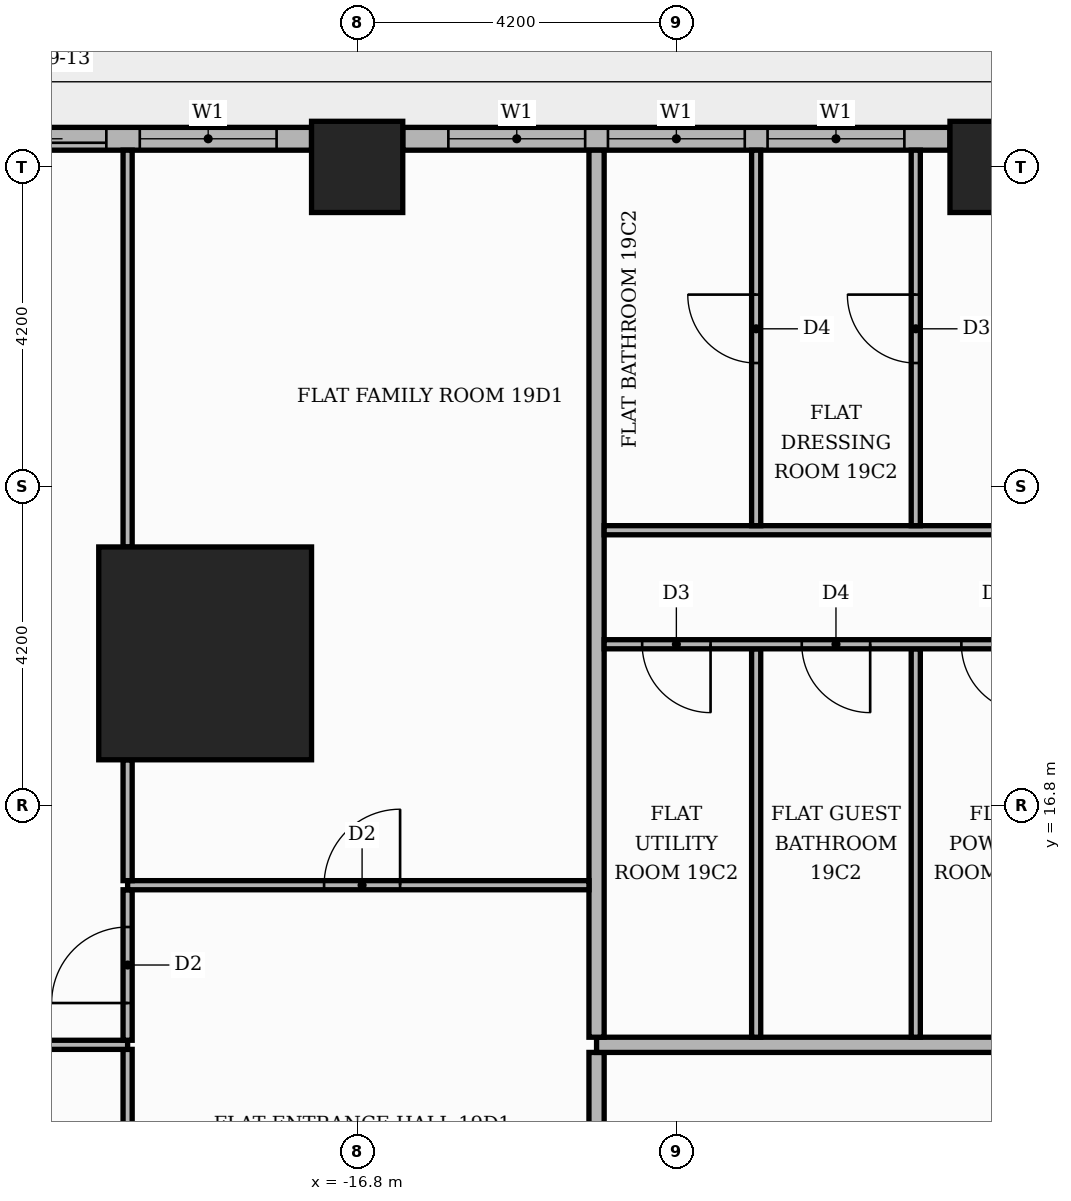
"""IFC4 building model, lengths in metres.
Left out: names, types, materials, properties, quantities, classifications, styles, units other than length and angle.
Written with IfcOpenShell. Run it as: python <this file> out.ifc"""

import sys

from ifc_helpers import new_model, si_unit, direction, frame, frame_2d, origin, origin_2d, place, context, subcontext, project, spatial, rectangle, extrude, element, fill, save


model = new_model("IFC4")
c1 = context("Model", 3, precision=1e-05, world=origin(), true_north=direction((0.0, 1.0)))
c2 = subcontext(c1, "Body", "Model", "MODEL_VIEW")
j1 = project(units=[si_unit("LENGTHUNIT", "METRE"), si_unit("PLANEANGLEUNIT", "RADIAN")], contexts=[c1])
p1 = place(None, origin())
s1 = spatial("IfcSite", under=j1, at=p1, CompositionType="ELEMENT")
p2 = place(p1, origin())
s2 = spatial("IfcBuilding", under=s1, at=p2, CompositionType="ELEMENT")
p3 = place(p2, frame((0.0, 0.0, 83.1)))
s3 = spatial("IfcBuildingStorey", under=s2, at=p3, CompositionType="ELEMENT", Elevation=83.1)
p4 = place(p3, frame((-18.8, 18.8, 0.0), z_axis=(0.0, 0.0, 1.0), x_axis=(1.0, 0.0, 0.0)))
e1 = element("IfcColumn", 1, at=p4, inside=s3, PredefinedType="COLUMN", context=c2, shape_type="SweptSolid", body=[
    extrude(rectangle(XDim=2.8, YDim=2.8, at=origin_2d()), origin(), (0.0, 0.0, 1.0), 3.9),
])
for number, where, z_axis, x_axis in (
    (2, (-8.4, 25.2, 0.0), (0.0, 0.0, 1.0), (1.0, 0.0, 0.0)),
    (3, (-16.8, 25.2, 0.0), (0.0, 0.0, 1.0), (1.0, 0.0, 0.0)),
):
    element("IfcColumn", number, at=place(p3, frame(where, z_axis=z_axis, x_axis=x_axis)), inside=s3, PredefinedType="COLUMN", context=c2, shape_type="SweptSolid", body=[
        extrude(rectangle(XDim=1.2, YDim=1.2, at=origin_2d()), origin(), (0.0, 0.0, 1.0), 3.9),
    ])
p5 = place(p3, frame((-9.0, 25.57, 0.0), z_axis=(0.0, 0.0, 1.0), x_axis=(-1.0, 0.0, 0.0)))
e4 = element("IfcWall", 4, at=p5, inside=s3, PredefinedType="STANDARD", context=c2, shape_type="SweptSolid", body=[
    extrude(rectangle(XDim=7.2, YDim=0.3, at=frame_2d((3.6, 0.0))), origin(), (0.0, 0.0, 1.0), 3.48),
])
p6 = place(p5, frame((0.6, 0.0, 0.9)))
e5 = element("IfcOpeningElement", 5, at=p6, cuts=e4, PredefinedType="OPENING", context=c2, shape_type="SweptSolid", body=[
    extrude(rectangle(XDim=1.8, YDim=2.1, at=frame_2d((0.9, 1.05))), frame((0.0, 0.16, 0.0), z_axis=(0.0, -1.0, 0.0), x_axis=(1.0, 0.0, 0.0)), (0.0, 0.0, 1.0), 0.32),
])
p7 = place(p5, frame((2.7, 0.0, 0.9)))
e6 = element("IfcOpeningElement", 6, at=p7, cuts=e4, PredefinedType="OPENING", context=c2, shape_type="SweptSolid", body=[
    extrude(rectangle(XDim=1.8, YDim=2.1, at=frame_2d((0.9, 1.05))), frame((0.0, 0.16, 0.0), z_axis=(0.0, -1.0, 0.0), x_axis=(1.0, 0.0, 0.0)), (0.0, 0.0, 1.0), 0.32),
])
p8 = place(p5, frame((4.8, 0.0, 0.9)))
e7 = element("IfcOpeningElement", 7, at=p8, cuts=e4, PredefinedType="OPENING", context=c2, shape_type="SweptSolid", body=[
    extrude(rectangle(XDim=1.8, YDim=2.1, at=frame_2d((0.9, 1.05))), frame((0.0, 0.16, 0.0), z_axis=(0.0, -1.0, 0.0), x_axis=(1.0, 0.0, 0.0)), (0.0, 0.0, 1.0), 0.32),
])
p9 = place(p3, frame((-17.4, 25.57, 0.0), z_axis=(0.0, 0.0, 1.0), x_axis=(-1.0, 0.0, 0.0)))
e8 = element("IfcWall", 8, at=p9, inside=s3, PredefinedType="STANDARD", context=c2, shape_type="SweptSolid", body=[
    extrude(rectangle(XDim=4.82, YDim=0.3, at=frame_2d((2.41, 0.0))), origin(), (0.0, 0.0, 1.0), 3.48),
])
p10 = place(p9, frame((2.7, 0.0, 0.0)))
e9 = element("IfcOpeningElement", 9, at=p10, cuts=e8, PredefinedType="OPENING", context=c2, shape_type="SweptSolid", body=[
    extrude(rectangle(XDim=1.8, YDim=2.4, at=frame_2d((0.9, 1.2))), frame((0.0, 0.16, 0.0), z_axis=(0.0, -1.0, 0.0), x_axis=(1.0, 0.0, 0.0)), (0.0, 0.0, 1.0), 0.32),
])
p11 = place(p9, frame((0.46, 0.0, 0.9)))
e10 = element("IfcOpeningElement", 10, at=p11, cuts=e8, PredefinedType="OPENING", context=c2, shape_type="SweptSolid", body=[
    extrude(rectangle(XDim=1.8, YDim=2.1, at=frame_2d((0.9, 1.05))), frame((0.0, 0.16, 0.0), z_axis=(0.0, -1.0, 0.0), x_axis=(1.0, 0.0, 0.0)), (0.0, 0.0, 1.0), 0.32),
])
p12 = place(p3, frame((-13.65, 5.35, 0.0), z_axis=(0.0, 0.0, 1.0), x_axis=(0.0, 1.0, 0.0)))
e11 = element("IfcWall", 11, at=p12, inside=s3, PredefinedType="PARTITIONING", context=c2, shape_type="SweptSolid", body=[
    extrude(rectangle(XDim=8.2, YDim=0.2, at=frame_2d((4.1, 0.0))), origin(), (0.0, 0.0, 1.0), 3.48),
])
p13 = place(p12, frame((5.65, 0.0, 0.0)))
e12 = element("IfcOpeningElement", 12, at=p13, cuts=e11, PredefinedType="OPENING", context=c2, shape_type="SweptSolid", body=[
    extrude(rectangle(XDim=1.1, YDim=2.4, at=frame_2d((0.55, 1.2))), frame((0.0, 0.11, 0.0), z_axis=(0.0, -1.0, 0.0), x_axis=(1.0, 0.0, 0.0)), (0.0, 0.0, 1.0), 0.22),
])
p14 = place(p3, frame((-19.82, 9.51, 0.0), z_axis=(0.0, 0.0, 1.0), x_axis=(0.0, 1.0, 0.0)))
e13 = element("IfcWall", 13, at=p14, inside=s3, PredefinedType="PARTITIONING", context=c2, shape_type="SweptSolid", body=[
    extrude(rectangle(XDim=4.08, YDim=0.12, at=frame_2d((2.04, 0.0))), origin(), (0.0, 0.0, 1.0), 3.48),
])
p15 = place(p14, frame((1.59, 0.0, 0.0)))
e14 = element("IfcOpeningElement", 14, at=p15, cuts=e13, PredefinedType="OPENING", context=c2, shape_type="SweptSolid", body=[
    extrude(rectangle(XDim=0.9, YDim=2.1, at=frame_2d((0.45, 1.05))), frame((0.0, 0.07, 0.0), z_axis=(0.0, -1.0, 0.0), x_axis=(1.0, 0.0, 0.0)), (0.0, 0.0, 1.0), 0.14),
])
p16 = place(p3, frame((-25.42, 13.65, 0.0), z_axis=(0.0, 0.0, 1.0), x_axis=(1.0, 0.0, 0.0)))
e15 = element("IfcWall", 15, at=p16, inside=s3, PredefinedType="PARTITIONING", context=c2, shape_type="SweptSolid", body=[
    extrude(rectangle(XDim=5.6, YDim=0.12, at=frame_2d((2.8, 0.0))), origin(), (0.0, 0.0, 1.0), 3.48),
])
p17 = place(p3, frame((-13.65, 13.65, 0.0), z_axis=(0.0, 0.0, 1.0), x_axis=(1.0, 0.0, 0.0)))
e16 = element("IfcWall", 16, at=p17, inside=s3, PredefinedType="PARTITIONING", context=c2, shape_type="SweptSolid", body=[
    extrude(rectangle(XDim=39.07, YDim=0.2, at=frame_2d((19.535, 0.0))), origin(), (0.0, 0.0, 1.0), 3.48),
])
p18 = place(p17, frame((24.65, 0.0, 0.0)))
e17 = element("IfcOpeningElement", 17, at=p18, cuts=e16, PredefinedType="OPENING", context=c2, shape_type="SweptSolid", body=[
    extrude(rectangle(XDim=1.1, YDim=2.4, at=frame_2d((0.55, 1.2))), frame((0.0, 0.11, 0.0), z_axis=(0.0, -1.0, 0.0), x_axis=(1.0, 0.0, 0.0)), (0.0, 0.0, 1.0), 0.22),
])
p19 = place(p17, frame((16.25, 0.0, 0.0)))
e18 = element("IfcOpeningElement", 18, at=p19, cuts=e16, PredefinedType="OPENING", context=c2, shape_type="SweptSolid", body=[
    extrude(rectangle(XDim=1.1, YDim=2.4, at=frame_2d((0.55, 1.2))), frame((0.0, 0.11, 0.0), z_axis=(0.0, -1.0, 0.0), x_axis=(1.0, 0.0, 0.0)), (0.0, 0.0, 1.0), 0.22),
])
p20 = place(p3, frame((-19.82, 13.71, 0.0), z_axis=(0.0, 0.0, 1.0), x_axis=(0.0, 1.0, 0.0)))
e19 = element("IfcWall", 19, at=p20, inside=s3, PredefinedType="PARTITIONING", context=c2, shape_type="SweptSolid", body=[
    extrude(rectangle(XDim=1.98, YDim=0.12, at=frame_2d((0.99, 0.0))), origin(), (0.0, 0.0, 1.0), 3.48),
])
p21 = place(p20, frame((0.49, 0.0, 0.0)))
e20 = element("IfcOpeningElement", 20, at=p21, cuts=e19, PredefinedType="OPENING", context=c2, shape_type="SweptSolid", body=[
    extrude(rectangle(XDim=1.0, YDim=2.1, at=frame_2d((0.5, 1.05))), frame((0.0, 0.07, 0.0), z_axis=(0.0, -1.0, 0.0), x_axis=(1.0, 0.0, 0.0)), (0.0, 0.0, 1.0), 0.14),
])
p22 = place(p3, frame((-13.65, 13.75, 0.0), z_axis=(0.0, 0.0, 1.0), x_axis=(0.0, 1.0, 0.0)))
e21 = element("IfcWall", 21, at=p22, inside=s3, PredefinedType="PARTITIONING", context=c2, shape_type="SweptSolid", body=[
    extrude(rectangle(XDim=11.67, YDim=0.2, at=frame_2d((5.835, 0.0))), origin(), (0.0, 0.0, 1.0), 3.48),
])
for number, where, z_axis, x_axis in (
    (22, (-11.55, 13.75, 0.0), (0.0, 0.0, 1.0), (0.0, 1.0, 0.0)),
    (23, (-9.45, 13.75, 0.0), (0.0, 0.0, 1.0), (0.0, 1.0, 0.0)),
):
    element("IfcWall", number, at=place(p3, frame(where, z_axis=z_axis, x_axis=x_axis)), inside=s3, PredefinedType="PARTITIONING", context=c2, shape_type="SweptSolid", body=[
        extrude(rectangle(XDim=5.11, YDim=0.12, at=frame_2d((2.555, 0.0))), origin(), (0.0, 0.0, 1.0), 3.48),
    ])
p23 = place(p3, frame((-19.82, 15.75, 0.0), z_axis=(0.0, 0.0, 1.0), x_axis=(1.0, 0.0, 0.0)))
e24 = element("IfcWall", 24, at=p23, inside=s3, PredefinedType="PARTITIONING", context=c2, shape_type="SweptSolid", body=[
    extrude(rectangle(XDim=6.07, YDim=0.12, at=frame_2d((3.035, 0.0))), origin(), (0.0, 0.0, 1.0), 3.48),
])
p24 = place(p23, frame((2.585, 0.0, 0.0)))
e25 = element("IfcOpeningElement", 25, at=p24, cuts=e24, PredefinedType="OPENING", context=c2, shape_type="SweptSolid", body=[
    extrude(rectangle(XDim=1.0, YDim=2.1, at=frame_2d((0.5, 1.05))), frame((0.0, 0.07, 0.0), z_axis=(0.0, -1.0, 0.0), x_axis=(1.0, 0.0, 0.0)), (0.0, 0.0, 1.0), 0.14),
])
p25 = place(p3, frame((-19.82, 15.81, 0.0), z_axis=(0.0, 0.0, 1.0), x_axis=(0.0, 1.0, 0.0)))
e26 = element("IfcWall", 26, at=p25, inside=s3, PredefinedType="PARTITIONING", context=c2, shape_type="SweptSolid", body=[
    extrude(rectangle(XDim=1.59, YDim=0.12, at=frame_2d((0.795, 0.0))), origin(), (0.0, 0.0, 1.0), 3.48),
])
p26 = place(p3, frame((-13.55, 18.92, 0.0), z_axis=(0.0, 0.0, 1.0), x_axis=(1.0, 0.0, 0.0)))
e27 = element("IfcWall", 27, at=p26, inside=s3, PredefinedType="PARTITIONING", context=c2, shape_type="SweptSolid", body=[
    extrude(rectangle(XDim=14.6, YDim=0.12, at=frame_2d((7.3, 0.0))), origin(), (0.0, 0.0, 1.0), 3.48),
])
p27 = place(p26, frame((11.0, 0.0, 0.0)))
e28 = element("IfcOpeningElement", 28, at=p27, cuts=e27, PredefinedType="OPENING", context=c2, shape_type="SweptSolid", body=[
    extrude(rectangle(XDim=0.9, YDim=2.1, at=frame_2d((0.45, 1.05))), frame((0.0, 0.07, 0.0), z_axis=(0.0, -1.0, 0.0), x_axis=(1.0, 0.0, 0.0)), (0.0, 0.0, 1.0), 0.14),
])
p28 = place(p26, frame((6.8, 0.0, 0.0)))
e29 = element("IfcOpeningElement", 29, at=p28, cuts=e27, PredefinedType="OPENING", context=c2, shape_type="SweptSolid", body=[
    extrude(rectangle(XDim=0.9, YDim=2.1, at=frame_2d((0.45, 1.05))), frame((0.0, 0.07, 0.0), z_axis=(0.0, -1.0, 0.0), x_axis=(1.0, 0.0, 0.0)), (0.0, 0.0, 1.0), 0.14),
])
p29 = place(p26, frame((4.7, 0.0, 0.0)))
e30 = element("IfcOpeningElement", 30, at=p29, cuts=e27, PredefinedType="OPENING", context=c2, shape_type="SweptSolid", body=[
    extrude(rectangle(XDim=0.9, YDim=2.1, at=frame_2d((0.45, 1.05))), frame((0.0, 0.07, 0.0), z_axis=(0.0, -1.0, 0.0), x_axis=(1.0, 0.0, 0.0)), (0.0, 0.0, 1.0), 0.14),
])
p30 = place(p26, frame((2.6, 0.0, 0.0)))
e31 = element("IfcOpeningElement", 31, at=p30, cuts=e27, PredefinedType="OPENING", context=c2, shape_type="SweptSolid", body=[
    extrude(rectangle(XDim=0.9, YDim=2.1, at=frame_2d((0.45, 1.05))), frame((0.0, 0.07, 0.0), z_axis=(0.0, -1.0, 0.0), x_axis=(1.0, 0.0, 0.0)), (0.0, 0.0, 1.0), 0.14),
])
p31 = place(p26, frame((0.5, 0.0, 0.0)))
e32 = element("IfcOpeningElement", 32, at=p31, cuts=e27, PredefinedType="OPENING", context=c2, shape_type="SweptSolid", body=[
    extrude(rectangle(XDim=0.9, YDim=2.1, at=frame_2d((0.45, 1.05))), frame((0.0, 0.07, 0.0), z_axis=(0.0, -1.0, 0.0), x_axis=(1.0, 0.0, 0.0)), (0.0, 0.0, 1.0), 0.14),
])
p32 = place(p3, frame((-19.82, 20.2, 0.0), z_axis=(0.0, 0.0, 1.0), x_axis=(0.0, 1.0, 0.0)))
e33 = element("IfcWall", 33, at=p32, inside=s3, PredefinedType="PARTITIONING", context=c2, shape_type="SweptSolid", body=[
    extrude(rectangle(XDim=5.22, YDim=0.12, at=frame_2d((2.61, 0.0))), origin(), (0.0, 0.0, 1.0), 3.48),
])
p33 = place(p3, frame((-13.55, 20.42, 0.0), z_axis=(0.0, 0.0, 1.0), x_axis=(1.0, 0.0, 0.0)))
e34 = element("IfcWall", 34, at=p33, inside=s3, PredefinedType="PARTITIONING", context=c2, shape_type="SweptSolid", body=[
    extrude(rectangle(XDim=18.7, YDim=0.12, at=frame_2d((9.35, 0.0))), origin(), (0.0, 0.0, 1.0), 3.48),
])
p34 = place(p33, frame((16.2, 0.0, 0.0)))
e35 = element("IfcOpeningElement", 35, at=p34, cuts=e34, PredefinedType="OPENING", context=c2, shape_type="SweptSolid", body=[
    extrude(rectangle(XDim=1.0, YDim=2.1, at=frame_2d((0.5, 1.05))), frame((0.0, 0.07, 0.0), z_axis=(0.0, -1.0, 0.0), x_axis=(1.0, 0.0, 0.0)), (0.0, 0.0, 1.0), 0.14),
])
p35 = place(p33, frame((12.05, 0.0, 0.0)))
e36 = element("IfcOpeningElement", 36, at=p35, cuts=e34, PredefinedType="OPENING", context=c2, shape_type="SweptSolid", body=[
    extrude(rectangle(XDim=0.9, YDim=2.1, at=frame_2d((0.45, 1.05))), frame((0.0, 0.07, 0.0), z_axis=(0.0, -1.0, 0.0), x_axis=(1.0, 0.0, 0.0)), (0.0, 0.0, 1.0), 0.14),
])
p36 = place(p33, frame((5.75, 0.0, 0.0)))
e37 = element("IfcOpeningElement", 37, at=p36, cuts=e34, PredefinedType="OPENING", context=c2, shape_type="SweptSolid", body=[
    extrude(rectangle(XDim=0.9, YDim=2.1, at=frame_2d((0.45, 1.05))), frame((0.0, 0.07, 0.0), z_axis=(0.0, -1.0, 0.0), x_axis=(1.0, 0.0, 0.0)), (0.0, 0.0, 1.0), 0.14),
])
p37 = place(p3, frame((-11.55, 20.48, 0.0), z_axis=(0.0, 0.0, 1.0), x_axis=(0.0, 1.0, 0.0)))
e38 = element("IfcWall", 38, at=p37, inside=s3, PredefinedType="PARTITIONING", context=c2, shape_type="SweptSolid", body=[
    extrude(rectangle(XDim=4.94, YDim=0.12, at=frame_2d((2.47, 0.0))), origin(), (0.0, 0.0, 1.0), 3.48),
])
p38 = place(p37, frame((2.14, 0.0, 0.0)))
e39 = element("IfcOpeningElement", 39, at=p38, cuts=e38, PredefinedType="OPENING", context=c2, shape_type="SweptSolid", body=[
    extrude(rectangle(XDim=0.9, YDim=2.1, at=frame_2d((0.45, 1.05))), frame((0.0, 0.07, 0.0), z_axis=(0.0, -1.0, 0.0), x_axis=(1.0, 0.0, 0.0)), (0.0, 0.0, 1.0), 0.14),
])
p39 = place(p3, frame((-9.45, 20.48, 0.0), z_axis=(0.0, 0.0, 1.0), x_axis=(0.0, 1.0, 0.0)))
e40 = element("IfcWall", 40, at=p39, inside=s3, PredefinedType="PARTITIONING", context=c2, shape_type="SweptSolid", body=[
    extrude(rectangle(XDim=4.94, YDim=0.12, at=frame_2d((2.47, 0.0))), origin(), (0.0, 0.0, 1.0), 3.48),
])
p40 = place(p39, frame((2.14, 0.0, 0.0)))
e41 = element("IfcOpeningElement", 41, at=p40, cuts=e40, PredefinedType="OPENING", context=c2, shape_type="SweptSolid", body=[
    extrude(rectangle(XDim=0.9, YDim=2.1, at=frame_2d((0.45, 1.05))), frame((0.0, 0.07, 0.0), z_axis=(0.0, -1.0, 0.0), x_axis=(1.0, 0.0, 0.0)), (0.0, 0.0, 1.0), 0.14),
])
p41 = place(p6, origin())
e42 = element("IfcWindow", 42, at=p41, inside=s3, PartitioningType="SINGLE_PANEL", PredefinedType="WINDOW", context=c2, shape_type="SweptSolid", body=[
    extrude(rectangle(XDim=1.8, YDim=2.1, at=frame_2d((0.9, 1.05))), frame((0.0, 0.03, 0.0), z_axis=(0.0, -1.0, 0.0), x_axis=(1.0, 0.0, 0.0)), (0.0, 0.0, 1.0), 0.06),
])
fill(e5, e42)
p42 = place(p7, origin())
e43 = element("IfcWindow", 43, at=p42, inside=s3, PartitioningType="SINGLE_PANEL", PredefinedType="WINDOW", context=c2, shape_type="SweptSolid", body=[
    extrude(rectangle(XDim=1.8, YDim=2.1, at=frame_2d((0.9, 1.05))), frame((0.0, 0.03, 0.0), z_axis=(0.0, -1.0, 0.0), x_axis=(1.0, 0.0, 0.0)), (0.0, 0.0, 1.0), 0.06),
])
fill(e6, e43)
p43 = place(p8, origin())
e44 = element("IfcWindow", 44, at=p43, inside=s3, PartitioningType="SINGLE_PANEL", PredefinedType="WINDOW", context=c2, shape_type="SweptSolid", body=[
    extrude(rectangle(XDim=1.8, YDim=2.1, at=frame_2d((0.9, 1.05))), frame((0.0, 0.03, 0.0), z_axis=(0.0, -1.0, 0.0), x_axis=(1.0, 0.0, 0.0)), (0.0, 0.0, 1.0), 0.06),
])
fill(e7, e44)
p44 = place(p10, origin())
e45 = element("IfcDoor", 45, at=p44, inside=s3, OperationType="SLIDING_TO_LEFT", PredefinedType="DOOR", context=c2, shape_type="SweptSolid", body=[
    extrude(rectangle(XDim=1.8, YDim=2.4, at=frame_2d((0.9, 1.2))), frame((0.0, 0.025, 0.0), z_axis=(0.0, -1.0, 0.0), x_axis=(1.0, 0.0, 0.0)), (0.0, 0.0, 1.0), 0.05),
])
fill(e9, e45)
p45 = place(p11, origin())
e46 = element("IfcWindow", 46, at=p45, inside=s3, PartitioningType="SINGLE_PANEL", PredefinedType="WINDOW", context=c2, shape_type="SweptSolid", body=[
    extrude(rectangle(XDim=1.8, YDim=2.1, at=frame_2d((0.9, 1.05))), frame((0.0, 0.03, 0.0), z_axis=(0.0, -1.0, 0.0), x_axis=(1.0, 0.0, 0.0)), (0.0, 0.0, 1.0), 0.06),
])
fill(e10, e46)
p46 = place(p29, frame((0.9, 0.0, 0.0), z_axis=(0.0, 0.0, 1.0), x_axis=(-1.0, 0.0, 0.0)))
e47 = element("IfcDoor", 47, at=p46, inside=s3, OperationType="SINGLE_SWING_RIGHT", PredefinedType="DOOR", context=c2, shape_type="SweptSolid", body=[
    extrude(rectangle(XDim=0.9, YDim=2.1, at=frame_2d((0.45, 1.05))), frame((0.0, 0.025, 0.0), z_axis=(0.0, -1.0, 0.0), x_axis=(1.0, 0.0, 0.0)), (0.0, 0.0, 1.0), 0.05),
])
fill(e30, e47)
p47 = place(p30, frame((0.9, 0.0, 0.0), z_axis=(0.0, 0.0, 1.0), x_axis=(-1.0, 0.0, 0.0)))
e48 = element("IfcDoor", 48, at=p47, inside=s3, OperationType="SINGLE_SWING_RIGHT", PredefinedType="DOOR", context=c2, shape_type="SweptSolid", body=[
    extrude(rectangle(XDim=0.9, YDim=2.1, at=frame_2d((0.45, 1.05))), frame((0.0, 0.025, 0.0), z_axis=(0.0, -1.0, 0.0), x_axis=(1.0, 0.0, 0.0)), (0.0, 0.0, 1.0), 0.05),
])
fill(e31, e48)
p48 = place(p31, frame((0.9, 0.0, 0.0), z_axis=(0.0, 0.0, 1.0), x_axis=(-1.0, 0.0, 0.0)))
e49 = element("IfcDoor", 49, at=p48, inside=s3, OperationType="SINGLE_SWING_RIGHT", PredefinedType="DOOR", context=c2, shape_type="SweptSolid", body=[
    extrude(rectangle(XDim=0.9, YDim=2.1, at=frame_2d((0.45, 1.05))), frame((0.0, 0.025, 0.0), z_axis=(0.0, -1.0, 0.0), x_axis=(1.0, 0.0, 0.0)), (0.0, 0.0, 1.0), 0.05),
])
fill(e32, e49)
p49 = place(p40, origin())
e50 = element("IfcDoor", 50, at=p49, inside=s3, OperationType="SINGLE_SWING_RIGHT", PredefinedType="DOOR", context=c2, shape_type="SweptSolid", body=[
    extrude(rectangle(XDim=0.9, YDim=2.1, at=frame_2d((0.45, 1.05))), frame((0.0, 0.025, 0.0), z_axis=(0.0, -1.0, 0.0), x_axis=(1.0, 0.0, 0.0)), (0.0, 0.0, 1.0), 0.05),
])
fill(e41, e50)
p50 = place(p38, origin())
e51 = element("IfcDoor", 51, at=p50, inside=s3, OperationType="SINGLE_SWING_RIGHT", PredefinedType="DOOR", context=c2, shape_type="SweptSolid", body=[
    extrude(rectangle(XDim=0.9, YDim=2.1, at=frame_2d((0.45, 1.05))), frame((0.0, 0.025, 0.0), z_axis=(0.0, -1.0, 0.0), x_axis=(1.0, 0.0, 0.0)), (0.0, 0.0, 1.0), 0.05),
])
fill(e39, e51)
p51 = place(p24, origin())
e52 = element("IfcDoor", 52, at=p51, inside=s3, OperationType="SINGLE_SWING_RIGHT", PredefinedType="DOOR", context=c2, shape_type="SweptSolid", body=[
    extrude(rectangle(XDim=1.0, YDim=2.1, at=frame_2d((0.5, 1.05))), frame((0.0, 0.025, 0.0), z_axis=(0.0, -1.0, 0.0), x_axis=(1.0, 0.0, 0.0)), (0.0, 0.0, 1.0), 0.05),
])
fill(e25, e52)
p52 = place(p21, origin())
e53 = element("IfcDoor", 53, at=p52, inside=s3, OperationType="SINGLE_SWING_LEFT", PredefinedType="DOOR", context=c2, shape_type="SweptSolid", body=[
    extrude(rectangle(XDim=1.0, YDim=2.1, at=frame_2d((0.5, 1.05))), frame((0.0, 0.025, 0.0), z_axis=(0.0, -1.0, 0.0), x_axis=(1.0, 0.0, 0.0)), (0.0, 0.0, 1.0), 0.05),
])
fill(e20, e53)
save(model, sys.argv[1])
